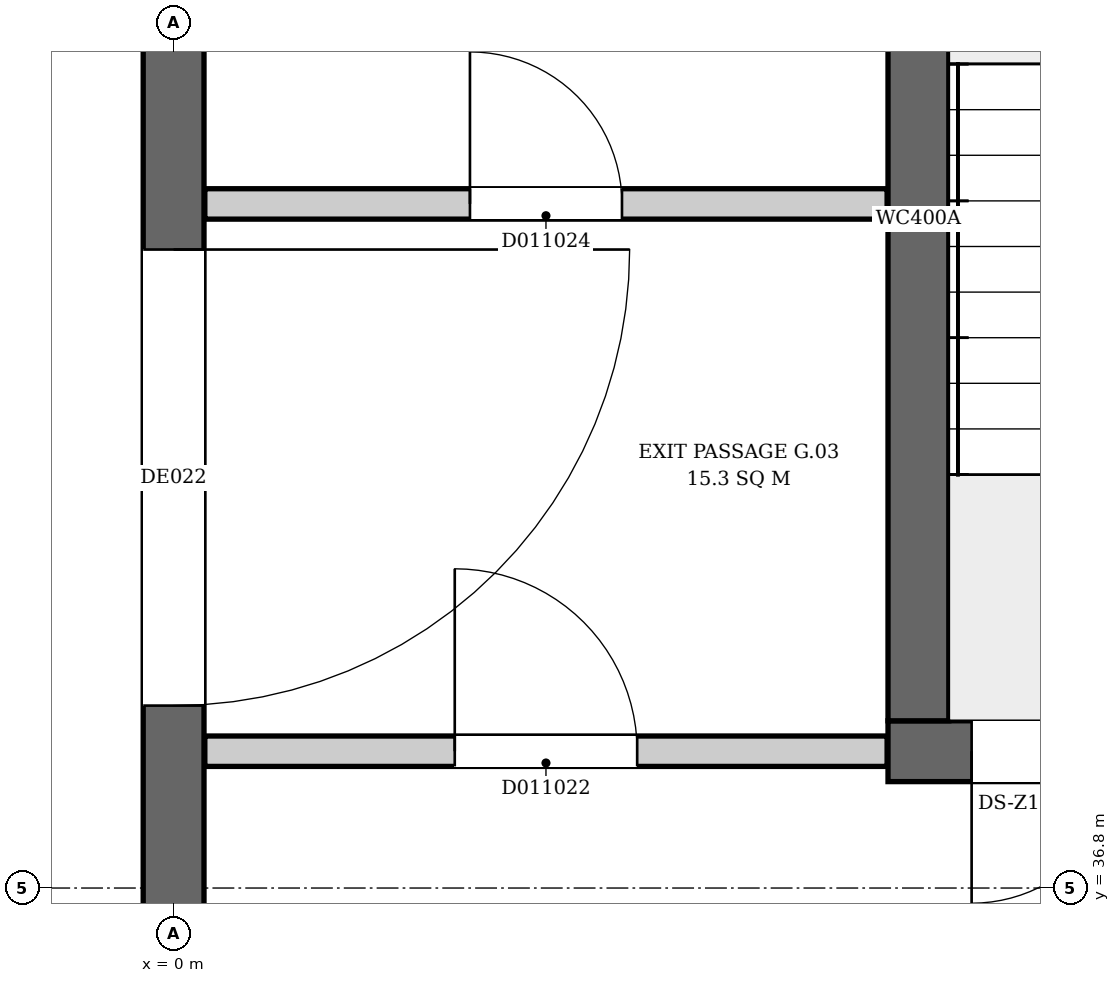
"""IFC4 building model, lengths in metres.
Left out: names, types, materials, properties, quantities, classifications, styles, units other than length and angle.
Written with IfcOpenShell. Run it as: python <this file> out.ifc"""

import sys

from ifc_helpers import new_model, si_unit, direction, frame, frame_2d, origin, place, context, subcontext, project, spatial, rectangle, extrude, element, fill, save


model = new_model("IFC4")
c1 = context("Model", 3, precision=1e-05, world=origin(), true_north=direction((0.0, 1.0)))
c2 = subcontext(c1, "Body", "Model", "MODEL_VIEW")
j1 = project(units=[si_unit("LENGTHUNIT", "METRE"), si_unit("PLANEANGLEUNIT", "RADIAN")], contexts=[c1])
p1 = place(None, origin())
s1 = spatial("IfcSite", under=j1, at=p1, CompositionType="ELEMENT")
p2 = place(p1, origin())
s2 = spatial("IfcBuilding", under=s1, at=p2, CompositionType="ELEMENT")
p3 = place(p2, origin())
s3 = spatial("IfcBuildingStorey", under=s2, at=p3, CompositionType="ELEMENT", Elevation=0.0)
p4 = place(p3, frame((0.0, -0.2, 0.0), z_axis=(0.0, 0.0, 1.0), x_axis=(0.0, 1.0, 0.0)))
e1 = element("IfcWall", 1, at=p4, inside=s3, PredefinedType="SHEAR", context=c2, shape_type="SweptSolid", body=[
    extrude(rectangle(XDim=46.88, YDim=0.4, at=frame_2d((23.44, 0.0))), origin(), (0.0, 0.0, 1.0), 6.5),
])
p5 = place(p4, frame((7.125, 0.0, 0.0)))
e2 = element("IfcOpeningElement", 2, at=p5, cuts=e1, PredefinedType="OPENING", context=c2, shape_type="SweptSolid", body=[
    extrude(rectangle(XDim=3.0, YDim=2.4, at=frame_2d((1.5, 1.2))), frame((0.0, 0.21, 0.0), z_axis=(0.0, -1.0, 0.0), x_axis=(1.0, 0.0, 0.0)), (0.0, 0.0, 1.0), 0.42),
])
p6 = place(p4, frame((38.2, 0.0, 0.0)))
e3 = element("IfcOpeningElement", 3, at=p6, cuts=e1, PredefinedType="OPENING", context=c2, shape_type="SweptSolid", body=[
    extrude(rectangle(XDim=3.0, YDim=2.4, at=frame_2d((1.5, 1.2))), frame((0.0, 0.21, 0.0), z_axis=(0.0, -1.0, 0.0), x_axis=(1.0, 0.0, 0.0)), (0.0, 0.0, 1.0), 0.42),
])
p7 = place(p3, frame((4.7, 37.7, 0.0), z_axis=(0.0, 0.0, 1.0), x_axis=(1.0, 0.0, 0.0)))
e4 = element("IfcWall", 4, at=p7, inside=s3, PredefinedType="SHEAR", context=c2, shape_type="SweptSolid", body=[
    extrude(rectangle(XDim=4.2, YDim=0.4, at=frame_2d((2.1, 0.0))), origin(), (0.0, 0.0, 1.0), 6.5),
])
p8 = place(p7, frame((0.55, 0.0, 0.0)))
e5 = element("IfcOpeningElement", 5, at=p8, cuts=e4, PredefinedType="OPENING", context=c2, shape_type="SweptSolid", body=[
    extrude(rectangle(XDim=1.0, YDim=2.1, at=frame_2d((0.5, 1.05))), frame((0.0, 0.21, 0.0), z_axis=(0.0, -1.0, 0.0), x_axis=(1.0, 0.0, 0.0)), (0.0, 0.0, 1.0), 0.42),
])
p9 = place(p7, frame((2.65, 0.0, 0.0)))
e6 = element("IfcOpeningElement", 6, at=p9, cuts=e4, PredefinedType="OPENING", context=c2, shape_type="SweptSolid", body=[
    extrude(rectangle(XDim=1.0, YDim=2.1, at=frame_2d((0.5, 1.05))), frame((0.0, 0.21, 0.0), z_axis=(0.0, -1.0, 0.0), x_axis=(1.0, 0.0, 0.0)), (0.0, 0.0, 1.0), 0.42),
])
p10 = place(p3, frame((4.9, 37.9, 0.0), z_axis=(0.0, 0.0, 1.0), x_axis=(0.0, 1.0, 0.0)))
e7 = element("IfcWall", 7, at=p10, inside=s3, PredefinedType="SHEAR", context=c2, shape_type="SweptSolid", body=[
    extrude(rectangle(XDim=6.6, YDim=0.4, at=frame_2d((3.3, 0.0))), origin(), (0.0, 0.0, 1.0), 6.5),
])
p11 = place(p3, frame((0.206, 37.7, 0.0), z_axis=(0.0, 0.0, 1.0), x_axis=(1.0, 0.0, 0.0)))
e8 = element("IfcWall", 8, at=p11, inside=s3, PredefinedType="PARTITIONING", context=c2, shape_type="SweptSolid", body=[
    extrude(rectangle(XDim=4.488, YDim=0.2, at=frame_2d((2.244, 0.0))), origin(), (0.0, 0.0, 1.0), 6.15),
])
p12 = place(p11, frame((1.644, 0.0, 0.0)))
e9 = element("IfcOpeningElement", 9, at=p12, cuts=e8, PredefinedType="OPENING", context=c2, shape_type="SweptSolid", body=[
    extrude(rectangle(XDim=1.2, YDim=2.1, at=frame_2d((0.6, 1.05))), frame((0.0, 0.11, 0.0), z_axis=(0.0, -1.0, 0.0), x_axis=(1.0, 0.0, 0.0)), (0.0, 0.0, 1.0), 0.22),
])
p13 = place(p3, frame((0.206, 41.3, 0.0), z_axis=(0.0, 0.0, 1.0), x_axis=(1.0, 0.0, 0.0)))
e10 = element("IfcWall", 10, at=p13, inside=s3, PredefinedType="PARTITIONING", context=c2, shape_type="SweptSolid", body=[
    extrude(rectangle(XDim=4.488, YDim=0.2, at=frame_2d((2.244, 0.0))), origin(), (0.0, 0.0, 1.0), 6.15),
])
p14 = place(p13, frame((1.744, 0.0, 0.0)))
e11 = element("IfcOpeningElement", 11, at=p14, cuts=e10, PredefinedType="OPENING", context=c2, shape_type="SweptSolid", body=[
    extrude(rectangle(XDim=1.0, YDim=2.1, at=frame_2d((0.5, 1.05))), frame((0.0, 0.11, 0.0), z_axis=(0.0, -1.0, 0.0), x_axis=(1.0, 0.0, 0.0)), (0.0, 0.0, 1.0), 0.22),
])
p15 = place(p6, origin())
e12 = element("IfcDoor", 12, at=p15, inside=s3, OperationType="DOUBLE_DOOR_SINGLE_SWING", PredefinedType="DOOR", context=c2, shape_type="SweptSolid", body=[
    extrude(rectangle(XDim=3.0, YDim=2.4, at=frame_2d((1.5, 1.2))), frame((0.0, 0.025, 0.0), z_axis=(0.0, -1.0, 0.0), x_axis=(1.0, 0.0, 0.0)), (0.0, 0.0, 1.0), 0.05),
])
fill(e3, e12)
p16 = place(p8, origin())
e13 = element("IfcDoor", 13, at=p16, inside=s3, OperationType="SINGLE_SWING_LEFT", PredefinedType="DOOR", context=c2, shape_type="SweptSolid", body=[
    extrude(rectangle(XDim=1.0, YDim=2.1, at=frame_2d((0.5, 1.05))), frame((0.0, 0.025, 0.0), z_axis=(0.0, -1.0, 0.0), x_axis=(1.0, 0.0, 0.0)), (0.0, 0.0, 1.0), 0.05),
])
fill(e5, e13)
p17 = place(p12, origin())
e14 = element("IfcDoor", 14, at=p17, inside=s3, OperationType="SINGLE_SWING_RIGHT", PredefinedType="DOOR", context=c2, shape_type="SweptSolid", body=[
    extrude(rectangle(XDim=1.2, YDim=2.1, at=frame_2d((0.6, 1.05))), frame((0.0, 0.025, 0.0), z_axis=(0.0, -1.0, 0.0), x_axis=(1.0, 0.0, 0.0)), (0.0, 0.0, 1.0), 0.05),
])
fill(e9, e14)
p18 = place(p14, origin())
e15 = element("IfcDoor", 15, at=p18, inside=s3, OperationType="SINGLE_SWING_RIGHT", PredefinedType="DOOR", context=c2, shape_type="SweptSolid", body=[
    extrude(rectangle(XDim=1.0, YDim=2.1, at=frame_2d((0.5, 1.05))), frame((0.0, 0.025, 0.0), z_axis=(0.0, -1.0, 0.0), x_axis=(1.0, 0.0, 0.0)), (0.0, 0.0, 1.0), 0.05),
])
fill(e11, e15)
save(model, sys.argv[1])
